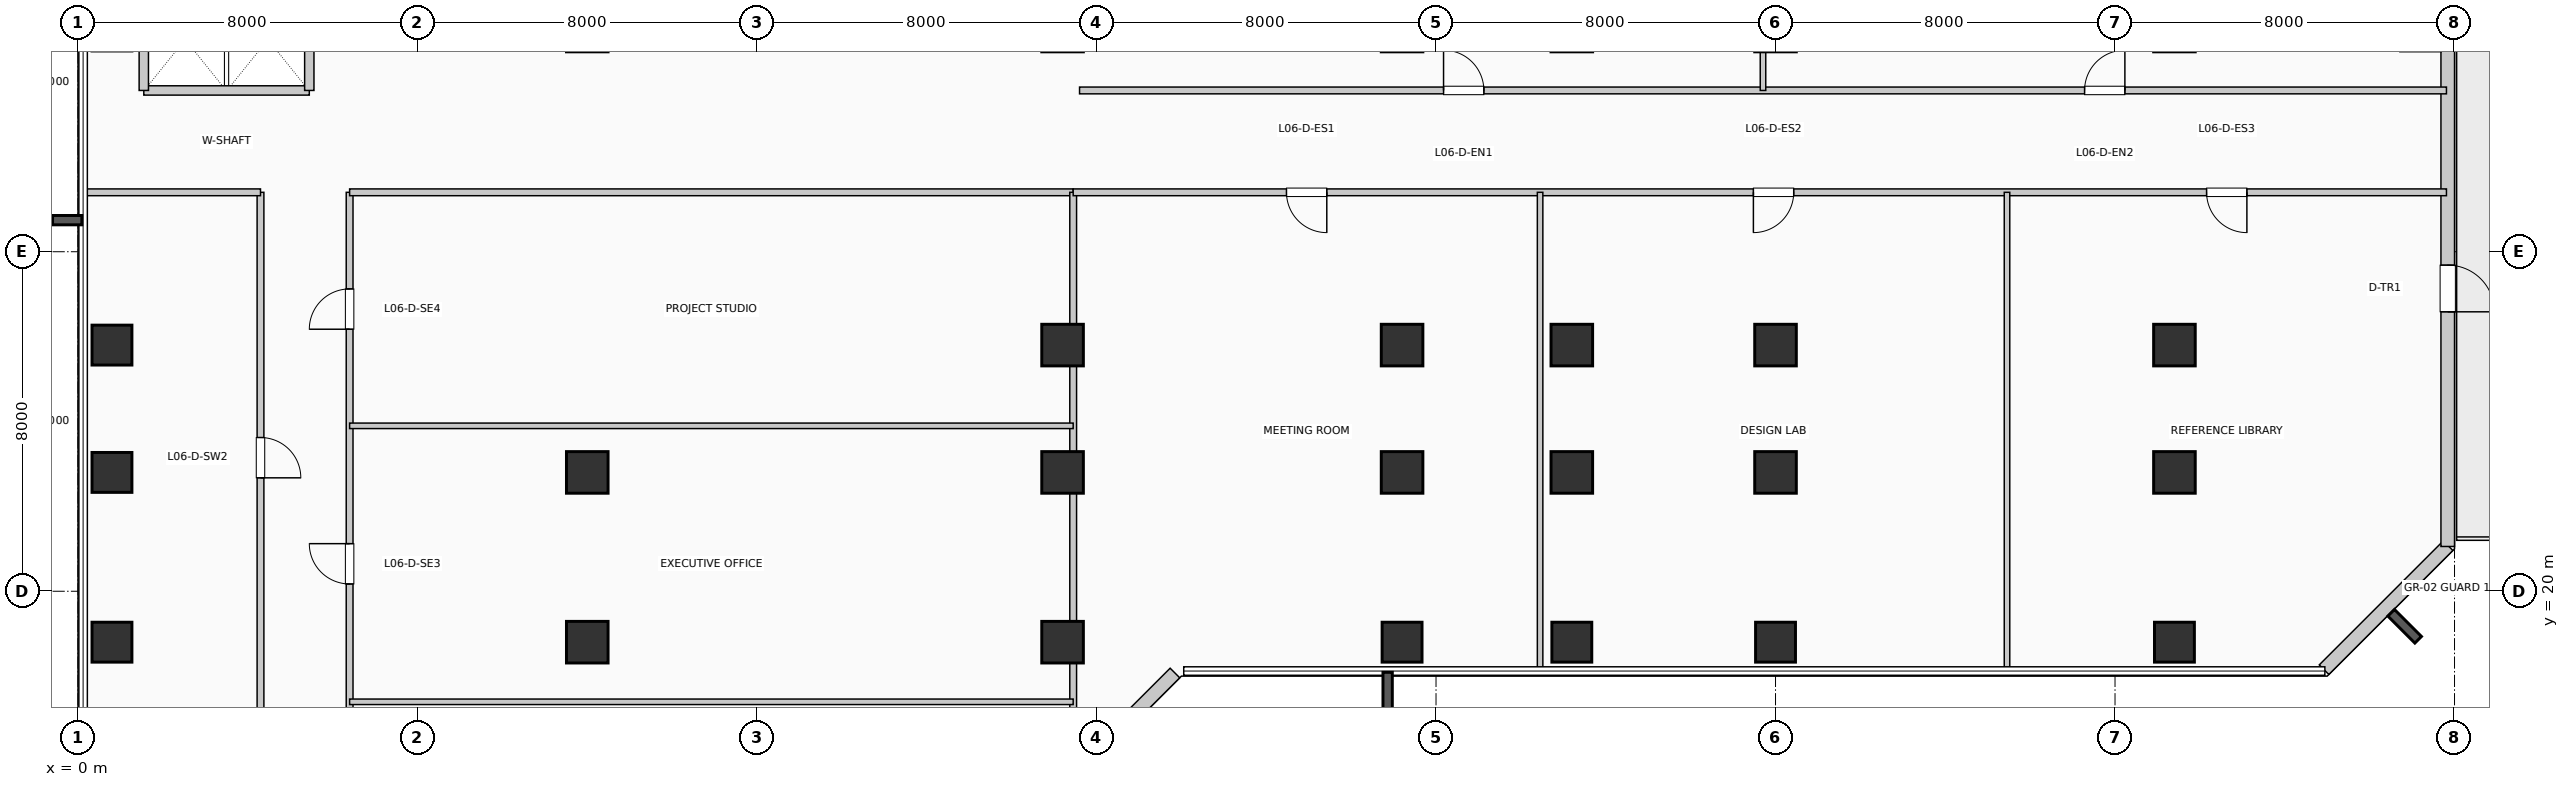
"""IFC4 building model, lengths in metres.
Left out: names, types, materials, properties, quantities, classifications, styles, units other than length and angle.
Written with IfcOpenShell. Run it as: python <this file> out.ifc"""

import sys

from ifc_helpers import new_model, si_unit, direction, frame, frame_2d, origin, origin_2d, place, context, subcontext, project, spatial, rectangle, extrude, element, fill, save


model = new_model("IFC4")
c1 = context("Model", 3, precision=1e-05, world=origin(), true_north=direction((0.0, 1.0)))
c2 = subcontext(c1, "Body", "Model", "MODEL_VIEW")
j1 = project(units=[si_unit("LENGTHUNIT", "METRE"), si_unit("PLANEANGLEUNIT", "RADIAN")], contexts=[c1])
p1 = place(None, origin())
s1 = spatial("IfcSite", under=j1, at=p1, CompositionType="ELEMENT")
p2 = place(p1, origin())
s2 = spatial("IfcBuilding", under=s1, at=p2, CompositionType="ELEMENT")
p3 = place(p2, frame((0.0, 0.0, 30.36)))
s3 = spatial("IfcBuildingStorey", under=s2, at=p3, CompositionType="ELEMENT", Elevation=30.36)
for number, where, z_axis, x_axis in (
    (1, (0.8, 18.8, 0.0), (0.0, 0.0, 1.0), (1.0, 0.0, 0.0)),
    (2, (0.8, 22.8, 0.0), (0.0, 0.0, 1.0), (1.0, 0.0, 0.0)),
    (3, (0.8, 25.8, 0.0), (0.0, 0.0, 1.0), (1.0, 0.0, 0.0)),
):
    element("IfcColumn", number, at=place(p3, frame(where, z_axis=z_axis, x_axis=x_axis)), inside=s3, PredefinedType="COLUMN", context=c2, shape_type="SweptSolid", body=[
        extrude(rectangle(XDim=0.94, YDim=0.94, at=origin_2d()), origin(), (0.0, 0.0, 1.0), 3.96),
    ])
for number, where, z_axis, x_axis in (
    (4, (12.0, 18.8, 0.0), (0.0, 0.0, 1.0), (1.0, 0.0, 0.0)),
    (5, (12.0, 22.8, 0.0), (0.0, 0.0, 1.0), (1.0, 0.0, 0.0)),
    (6, (23.2, 18.8, 0.0), (0.0, 0.0, 1.0), (1.0, 0.0, 0.0)),
    (7, (23.2, 22.8, 0.0), (0.0, 0.0, 1.0), (1.0, 0.0, 0.0)),
    (8, (23.2, 25.8, 0.0), (0.0, 0.0, 1.0), (1.0, 0.0, 0.0)),
):
    element("IfcColumn", number, at=place(p3, frame(where, z_axis=z_axis, x_axis=x_axis)), inside=s3, PredefinedType="COLUMN", context=c2, shape_type="SweptSolid", body=[
        extrude(rectangle(XDim=0.98, YDim=0.98, at=origin_2d()), origin(), (0.0, 0.0, 1.0), 3.96),
    ])
p4 = place(p3, frame((31.2, 18.8, 0.0), z_axis=(0.0, 0.0, 1.0), x_axis=(1.0, 0.0, 0.0)))
e9 = element("IfcColumn", 9, at=p4, inside=s3, PredefinedType="COLUMN", context=c2, shape_type="SweptSolid", body=[
    extrude(rectangle(XDim=0.94, YDim=0.94, at=origin_2d()), origin(), (0.0, 0.0, 1.0), 3.96),
])
for number, where, z_axis, x_axis in (
    (10, (31.2, 22.8, 0.0), (0.0, 0.0, 1.0), (1.0, 0.0, 0.0)),
    (11, (31.2, 25.8, 0.0), (0.0, 0.0, 1.0), (1.0, 0.0, 0.0)),
):
    element("IfcColumn", number, at=place(p3, frame(where, z_axis=z_axis, x_axis=x_axis)), inside=s3, PredefinedType="COLUMN", context=c2, shape_type="SweptSolid", body=[
        extrude(rectangle(XDim=0.98, YDim=0.98, at=origin_2d()), origin(), (0.0, 0.0, 1.0), 3.96),
    ])
p5 = place(p3, frame((35.2, 18.8, 0.0), z_axis=(0.0, 0.0, 1.0), x_axis=(1.0, 0.0, 0.0)))
e12 = element("IfcColumn", 12, at=p5, inside=s3, PredefinedType="COLUMN", context=c2, shape_type="SweptSolid", body=[
    extrude(rectangle(XDim=0.94, YDim=0.94, at=origin_2d()), origin(), (0.0, 0.0, 1.0), 3.96),
])
for number, where, z_axis, x_axis in (
    (13, (35.2, 22.8, 0.0), (0.0, 0.0, 1.0), (1.0, 0.0, 0.0)),
    (14, (35.2, 25.8, 0.0), (0.0, 0.0, 1.0), (1.0, 0.0, 0.0)),
):
    element("IfcColumn", number, at=place(p3, frame(where, z_axis=z_axis, x_axis=x_axis)), inside=s3, PredefinedType="COLUMN", context=c2, shape_type="SweptSolid", body=[
        extrude(rectangle(XDim=0.98, YDim=0.98, at=origin_2d()), origin(), (0.0, 0.0, 1.0), 3.96),
    ])
p6 = place(p3, frame((40.0, 18.8, 0.0), z_axis=(0.0, 0.0, 1.0), x_axis=(1.0, 0.0, 0.0)))
e15 = element("IfcColumn", 15, at=p6, inside=s3, PredefinedType="COLUMN", context=c2, shape_type="SweptSolid", body=[
    extrude(rectangle(XDim=0.94, YDim=0.94, at=origin_2d()), origin(), (0.0, 0.0, 1.0), 3.96),
])
for number, where, z_axis, x_axis in (
    (16, (40.0, 22.8, 0.0), (0.0, 0.0, 1.0), (1.0, 0.0, 0.0)),
    (17, (40.0, 25.8, 0.0), (0.0, 0.0, 1.0), (1.0, 0.0, 0.0)),
):
    element("IfcColumn", number, at=place(p3, frame(where, z_axis=z_axis, x_axis=x_axis)), inside=s3, PredefinedType="COLUMN", context=c2, shape_type="SweptSolid", body=[
        extrude(rectangle(XDim=0.98, YDim=0.98, at=origin_2d()), origin(), (0.0, 0.0, 1.0), 3.96),
    ])
p7 = place(p3, frame((49.4, 18.8, 0.0), z_axis=(0.0, 0.0, 1.0), x_axis=(1.0, 0.0, 0.0)))
e18 = element("IfcColumn", 18, at=p7, inside=s3, PredefinedType="COLUMN", context=c2, shape_type="SweptSolid", body=[
    extrude(rectangle(XDim=0.94, YDim=0.94, at=origin_2d()), origin(), (0.0, 0.0, 1.0), 3.96),
])
for number, where, z_axis, x_axis in (
    (19, (49.4, 22.8, 0.0), (0.0, 0.0, 1.0), (1.0, 0.0, 0.0)),
    (20, (49.4, 25.8, 0.0), (0.0, 0.0, 1.0), (1.0, 0.0, 0.0)),
):
    element("IfcColumn", number, at=place(p3, frame(where, z_axis=z_axis, x_axis=x_axis)), inside=s3, PredefinedType="COLUMN", context=c2, shape_type="SweptSolid", body=[
        extrude(rectangle(XDim=0.98, YDim=0.98, at=origin_2d()), origin(), (0.0, 0.0, 1.0), 3.96),
    ])
p8 = place(p3, frame((23.926, 16.152, 0.0), z_axis=(0.0, 0.0, 1.0), x_axis=(0.707106781187, 0.707106781187, 0.0)))
e21 = element("IfcWall", 21, at=p8, inside=s3, PredefinedType="SOLIDWALL", context=c2, shape_type="SweptSolid", body=[
    extrude(rectangle(XDim=2.718, YDim=0.32, at=frame_2d((1.359, 0.0))), origin(), (0.0, 0.0, 1.0), 3.71),
])
p9 = place(p3, frame((52.926, 18.152, 0.0), z_axis=(0.0, 0.0, 1.0), x_axis=(0.707106781187, 0.707106781187, 0.0)))
e22 = element("IfcWall", 22, at=p9, inside=s3, PredefinedType="SOLIDWALL", context=c2, shape_type="SweptSolid", body=[
    extrude(rectangle(XDim=4.133, YDim=0.32, at=frame_2d((2.066, 0.0))), origin(), (0.0, 0.0, 1.0), 3.71),
])
p10 = place(p3, frame((55.84, 21.055, 0.0), z_axis=(0.0, 0.0, 1.0), x_axis=(0.0, 1.0, 0.0)))
e23 = element("IfcWall", 23, at=p10, inside=s3, PredefinedType="SOLIDWALL", context=c2, shape_type="SweptSolid", body=[
    extrude(rectangle(XDim=21.89, YDim=0.32, at=frame_2d((10.945, 0.0))), origin(), (0.0, 0.0, 1.0), 3.71),
])
p11 = place(p10, frame((6.629, 0.0, 0.0), z_axis=(0.0, 0.0, 1.0), x_axis=(-1.0, 0.0, 0.0)))
e24 = element("IfcOpeningElement", 24, at=p11, cuts=e23, PredefinedType="OPENING", context=c2, shape_type="SweptSolid", body=[
    extrude(rectangle(XDim=1.1, YDim=2.2, at=frame_2d((0.55, 1.1))), frame((0.0, 0.17, 0.0), z_axis=(0.0, -1.0, 0.0), x_axis=(1.0, 0.0, 0.0)), (0.0, 0.0, 1.0), 0.34),
])
p12 = place(p3, frame((1.55, 31.8, 0.0), z_axis=(0.0, 0.0, 1.0), x_axis=(1.0, 0.0, 0.0)))
e25 = element("IfcWall", 25, at=p12, inside=s3, PredefinedType="PARTITIONING", context=c2, shape_type="SweptSolid", body=[
    extrude(rectangle(XDim=3.9, YDim=0.22, at=frame_2d((1.95, 0.0))), origin(), (0.0, 0.0, 1.0), 3.71),
])
for number, where, z_axis, x_axis in (
    (26, (1.55, 31.8, 0.0), (0.0, 0.0, 1.0), (0.0, 1.0, 0.0)),
    (27, (5.45, 31.8, 0.0), (0.0, 0.0, 1.0), (0.0, 1.0, 0.0)),
):
    element("IfcWall", number, at=place(p3, frame(where, z_axis=z_axis, x_axis=x_axis)), inside=s3, PredefinedType="PARTITIONING", context=c2, shape_type="SweptSolid", body=[
        extrude(rectangle(XDim=2.38, YDim=0.22, at=frame_2d((1.19, 0.0))), origin(), (0.0, 0.0, 1.0), 3.71),
    ])
p13 = place(p3, frame((4.3, 4.39, 0.0), z_axis=(0.0, 0.0, 1.0), x_axis=(0.0, 1.0, 0.0)))
e28 = element("IfcWall", 28, at=p13, inside=s3, PredefinedType="PARTITIONING", context=c2, shape_type="SweptSolid", body=[
    extrude(rectangle(XDim=25.01, YDim=0.16, at=frame_2d((12.505, 0.0))), origin(), (0.0, 0.0, 1.0), 3.71),
])
p14 = place(p13, frame((6.728, 0.0, 0.0), z_axis=(0.0, 0.0, 1.0), x_axis=(-1.0, 0.0, 0.0)))
e29 = element("IfcOpeningElement", 29, at=p14, cuts=e28, PredefinedType="OPENING", context=c2, shape_type="SweptSolid", body=[
    extrude(rectangle(XDim=0.95, YDim=2.15, at=frame_2d((0.475, 1.075))), frame((0.0, 0.09, 0.0), z_axis=(0.0, -1.0, 0.0), x_axis=(1.0, 0.0, 0.0)), (0.0, 0.0, 1.0), 0.18),
])
p15 = place(p13, frame((19.232, 0.0, 0.0), z_axis=(0.0, 0.0, 1.0), x_axis=(-1.0, 0.0, 0.0)))
e30 = element("IfcOpeningElement", 30, at=p15, cuts=e28, PredefinedType="OPENING", context=c2, shape_type="SweptSolid", body=[
    extrude(rectangle(XDim=0.95, YDim=2.15, at=frame_2d((0.475, 1.075))), frame((0.0, 0.09, 0.0), z_axis=(0.0, -1.0, 0.0), x_axis=(1.0, 0.0, 0.0)), (0.0, 0.0, 1.0), 0.18),
])
p16 = place(p3, frame((6.4, 4.39, 0.0), z_axis=(0.0, 0.0, 1.0), x_axis=(0.0, 1.0, 0.0)))
e31 = element("IfcWall", 31, at=p16, inside=s3, PredefinedType="PARTITIONING", context=c2, shape_type="SweptSolid", body=[
    extrude(rectangle(XDim=25.01, YDim=0.16, at=frame_2d((12.505, 0.0))), origin(), (0.0, 0.0, 1.0), 3.71),
])
p17 = place(p16, frame((2.526, 0.0, 0.0)))
e32 = element("IfcOpeningElement", 32, at=p17, cuts=e31, PredefinedType="OPENING", context=c2, shape_type="SweptSolid", body=[
    extrude(rectangle(XDim=0.95, YDim=2.15, at=frame_2d((0.475, 1.075))), frame((0.0, 0.09, 0.0), z_axis=(0.0, -1.0, 0.0), x_axis=(1.0, 0.0, 0.0)), (0.0, 0.0, 1.0), 0.18),
])
p18 = place(p16, frame((9.029, 0.0, 0.0)))
e33 = element("IfcOpeningElement", 33, at=p18, cuts=e31, PredefinedType="OPENING", context=c2, shape_type="SweptSolid", body=[
    extrude(rectangle(XDim=0.95, YDim=2.15, at=frame_2d((0.475, 1.075))), frame((0.0, 0.09, 0.0), z_axis=(0.0, -1.0, 0.0), x_axis=(1.0, 0.0, 0.0)), (0.0, 0.0, 1.0), 0.18),
])
p19 = place(p16, frame((15.781, 0.0, 0.0)))
e34 = element("IfcOpeningElement", 34, at=p19, cuts=e31, PredefinedType="OPENING", context=c2, shape_type="SweptSolid", body=[
    extrude(rectangle(XDim=0.95, YDim=2.15, at=frame_2d((0.475, 1.075))), frame((0.0, 0.09, 0.0), z_axis=(0.0, -1.0, 0.0), x_axis=(1.0, 0.0, 0.0)), (0.0, 0.0, 1.0), 0.18),
])
p20 = place(p16, frame((21.784, 0.0, 0.0)))
e35 = element("IfcOpeningElement", 35, at=p20, cuts=e31, PredefinedType="OPENING", context=c2, shape_type="SweptSolid", body=[
    extrude(rectangle(XDim=0.95, YDim=2.15, at=frame_2d((0.475, 1.075))), frame((0.0, 0.09, 0.0), z_axis=(0.0, -1.0, 0.0), x_axis=(1.0, 0.0, 0.0)), (0.0, 0.0, 1.0), 0.18),
])
p21 = place(p3, frame((0.19, 29.4, 0.0), z_axis=(0.0, 0.0, 1.0), x_axis=(1.0, 0.0, 0.0)))
e36 = element("IfcWall", 36, at=p21, inside=s3, PredefinedType="PARTITIONING", context=c2, shape_type="SweptSolid", body=[
    extrude(rectangle(XDim=4.11, YDim=0.16, at=frame_2d((2.055, 0.0))), origin(), (0.0, 0.0, 1.0), 3.365),
])
p22 = place(p3, frame((6.4, 29.4, 0.0), z_axis=(0.0, 0.0, 1.0), x_axis=(1.0, 0.0, 0.0)))
e37 = element("IfcWall", 37, at=p22, inside=s3, PredefinedType="PARTITIONING", context=c2, shape_type="SweptSolid", body=[
    extrude(rectangle(XDim=17.05, YDim=0.16, at=frame_2d((8.525, 0.0))), origin(), (0.0, 0.0, 1.0), 3.365),
])
p23 = place(p3, frame((23.45, 0.19, 0.0), z_axis=(0.0, 0.0, 1.0), x_axis=(0.0, 1.0, 0.0)))
e38 = element("IfcWall", 38, at=p23, inside=s3, PredefinedType="PARTITIONING", context=c2, shape_type="SweptSolid", body=[
    extrude(rectangle(XDim=29.21, YDim=0.16, at=frame_2d((14.605, 0.0))), origin(), (0.0, 0.0, 1.0), 2.995),
])
for number, where, z_axis, x_axis in (
    (39, (6.4, 17.395, 0.0), (0.0, 0.0, 1.0), (1.0, 0.0, 0.0)),
    (40, (6.4, 23.898, 0.0), (0.0, 0.0, 1.0), (1.0, 0.0, 0.0)),
):
    element("IfcWall", number, at=place(p3, frame(where, z_axis=z_axis, x_axis=x_axis)), inside=s3, PredefinedType="PARTITIONING", context=c2, shape_type="SweptSolid", body=[
        extrude(rectangle(XDim=17.05, YDim=0.13, at=frame_2d((8.525, 0.0))), origin(), (0.0, 0.0, 1.0), 3.71),
    ])
p24 = place(p3, frame((23.45, 29.4, 0.0), z_axis=(0.0, 0.0, 1.0), x_axis=(1.0, 0.0, 0.0)))
e41 = element("IfcWall", 41, at=p24, inside=s3, PredefinedType="PARTITIONING", context=c2, shape_type="SweptSolid", body=[
    extrude(rectangle(XDim=32.36, YDim=0.16, at=frame_2d((16.18, 0.0))), origin(), (0.0, 0.0, 1.0), 3.365),
])
p25 = place(p24, frame((5.976, 0.0, 0.0), z_axis=(0.0, 0.0, 1.0), x_axis=(-1.0, 0.0, 0.0)))
e42 = element("IfcOpeningElement", 42, at=p25, cuts=e41, PredefinedType="OPENING", context=c2, shape_type="SweptSolid", body=[
    extrude(rectangle(XDim=0.95, YDim=2.15, at=frame_2d((0.475, 1.075))), frame((0.0, 0.09, 0.0), z_axis=(0.0, -1.0, 0.0), x_axis=(1.0, 0.0, 0.0)), (0.0, 0.0, 1.0), 0.18),
])
p26 = place(p24, frame((16.979, 0.0, 0.0), z_axis=(0.0, 0.0, 1.0), x_axis=(-1.0, 0.0, 0.0)))
e43 = element("IfcOpeningElement", 43, at=p26, cuts=e41, PredefinedType="OPENING", context=c2, shape_type="SweptSolid", body=[
    extrude(rectangle(XDim=0.95, YDim=2.15, at=frame_2d((0.475, 1.075))), frame((0.0, 0.09, 0.0), z_axis=(0.0, -1.0, 0.0), x_axis=(1.0, 0.0, 0.0)), (0.0, 0.0, 1.0), 0.18),
])
p27 = place(p24, frame((27.657, 0.0, 0.0), z_axis=(0.0, 0.0, 1.0), x_axis=(-1.0, 0.0, 0.0)))
e44 = element("IfcOpeningElement", 44, at=p27, cuts=e41, PredefinedType="OPENING", context=c2, shape_type="SweptSolid", body=[
    extrude(rectangle(XDim=0.95, YDim=2.15, at=frame_2d((0.475, 1.075))), frame((0.0, 0.09, 0.0), z_axis=(0.0, -1.0, 0.0), x_axis=(1.0, 0.0, 0.0)), (0.0, 0.0, 1.0), 0.18),
])
p28 = place(p3, frame((23.6, 31.8, 0.0), z_axis=(0.0, 0.0, 1.0), x_axis=(1.0, 0.0, 0.0)))
e45 = element("IfcWall", 45, at=p28, inside=s3, PredefinedType="PARTITIONING", context=c2, shape_type="SweptSolid", body=[
    extrude(rectangle(XDim=32.21, YDim=0.16, at=frame_2d((16.105, 0.0))), origin(), (0.0, 0.0, 1.0), 3.71),
])
p29 = place(p28, frame((8.577, 0.0, 0.0)))
e46 = element("IfcOpeningElement", 46, at=p29, cuts=e45, PredefinedType="OPENING", context=c2, shape_type="SweptSolid", body=[
    extrude(rectangle(XDim=0.95, YDim=2.15, at=frame_2d((0.475, 1.075))), frame((0.0, 0.09, 0.0), z_axis=(0.0, -1.0, 0.0), x_axis=(1.0, 0.0, 0.0)), (0.0, 0.0, 1.0), 0.18),
])
p30 = place(p28, frame((23.683, 0.0, 0.0)))
e47 = element("IfcOpeningElement", 47, at=p30, cuts=e45, PredefinedType="OPENING", context=c2, shape_type="SweptSolid", body=[
    extrude(rectangle(XDim=0.95, YDim=2.15, at=frame_2d((0.475, 1.075))), frame((0.0, 0.09, 0.0), z_axis=(0.0, -1.0, 0.0), x_axis=(1.0, 0.0, 0.0)), (0.0, 0.0, 1.0), 0.18),
])
for number, where, z_axis, x_axis in (
    (48, (34.452, 18.19, 0.0), (0.0, 0.0, 1.0), (0.0, 1.0, 0.0)),
    (49, (45.455, 18.19, 0.0), (0.0, 0.0, 1.0), (0.0, 1.0, 0.0)),
):
    element("IfcWall", number, at=place(p3, frame(where, z_axis=z_axis, x_axis=x_axis)), inside=s3, PredefinedType="PARTITIONING", context=c2, shape_type="SweptSolid", body=[
        extrude(rectangle(XDim=11.21, YDim=0.13, at=frame_2d((5.605, 0.0))), origin(), (0.0, 0.0, 1.0), 3.71),
    ])
p31 = place(p3, frame((39.705, 31.8, 0.0), z_axis=(0.0, 0.0, 1.0), x_axis=(0.0, 1.0, 0.0)))
e50 = element("IfcWall", 50, at=p31, inside=s3, PredefinedType="PARTITIONING", context=c2, shape_type="SweptSolid", body=[
    extrude(rectangle(XDim=14.01, YDim=0.13, at=frame_2d((7.005, 0.0))), origin(), (0.0, 0.0, 1.0), 2.995),
])
p32 = place(p11, origin())
e51 = element("IfcDoor", 51, at=p32, inside=s3, OperationType="SINGLE_SWING_LEFT", PredefinedType="DOOR", context=c2, shape_type="SweptSolid", body=[
    extrude(rectangle(XDim=1.1, YDim=2.2, at=frame_2d((0.55, 1.1))), frame((0.0, 0.025, 0.0), z_axis=(0.0, -1.0, 0.0), x_axis=(1.0, 0.0, 0.0)), (0.0, 0.0, 1.0), 0.05),
])
fill(e24, e51)
p33 = place(p15, origin())
e52 = element("IfcDoor", 52, at=p33, inside=s3, OperationType="SINGLE_SWING_LEFT", PredefinedType="DOOR", context=c2, shape_type="SweptSolid", body=[
    extrude(rectangle(XDim=0.95, YDim=2.15, at=frame_2d((0.475, 1.075))), frame((0.0, 0.025, 0.0), z_axis=(0.0, -1.0, 0.0), x_axis=(1.0, 0.0, 0.0)), (0.0, 0.0, 1.0), 0.05),
])
fill(e30, e52)
p34 = place(p19, origin())
e53 = element("IfcDoor", 53, at=p34, inside=s3, OperationType="SINGLE_SWING_RIGHT", PredefinedType="DOOR", context=c2, shape_type="SweptSolid", body=[
    extrude(rectangle(XDim=0.95, YDim=2.15, at=frame_2d((0.475, 1.075))), frame((0.0, 0.025, 0.0), z_axis=(0.0, -1.0, 0.0), x_axis=(1.0, 0.0, 0.0)), (0.0, 0.0, 1.0), 0.05),
])
fill(e34, e53)
p35 = place(p20, origin())
e54 = element("IfcDoor", 54, at=p35, inside=s3, OperationType="SINGLE_SWING_LEFT", PredefinedType="DOOR", context=c2, shape_type="SweptSolid", body=[
    extrude(rectangle(XDim=0.95, YDim=2.15, at=frame_2d((0.475, 1.075))), frame((0.0, 0.025, 0.0), z_axis=(0.0, -1.0, 0.0), x_axis=(1.0, 0.0, 0.0)), (0.0, 0.0, 1.0), 0.05),
])
fill(e35, e54)
p36 = place(p25, origin())
e55 = element("IfcDoor", 55, at=p36, inside=s3, OperationType="SINGLE_SWING_RIGHT", PredefinedType="DOOR", context=c2, shape_type="SweptSolid", body=[
    extrude(rectangle(XDim=0.95, YDim=2.15, at=frame_2d((0.475, 1.075))), frame((0.0, 0.025, 0.0), z_axis=(0.0, -1.0, 0.0), x_axis=(1.0, 0.0, 0.0)), (0.0, 0.0, 1.0), 0.05),
])
fill(e42, e55)
p37 = place(p26, origin())
e56 = element("IfcDoor", 56, at=p37, inside=s3, OperationType="SINGLE_SWING_LEFT", PredefinedType="DOOR", context=c2, shape_type="SweptSolid", body=[
    extrude(rectangle(XDim=0.95, YDim=2.15, at=frame_2d((0.475, 1.075))), frame((0.0, 0.025, 0.0), z_axis=(0.0, -1.0, 0.0), x_axis=(1.0, 0.0, 0.0)), (0.0, 0.0, 1.0), 0.05),
])
fill(e43, e56)
p38 = place(p27, origin())
e57 = element("IfcDoor", 57, at=p38, inside=s3, OperationType="SINGLE_SWING_RIGHT", PredefinedType="DOOR", context=c2, shape_type="SweptSolid", body=[
    extrude(rectangle(XDim=0.95, YDim=2.15, at=frame_2d((0.475, 1.075))), frame((0.0, 0.025, 0.0), z_axis=(0.0, -1.0, 0.0), x_axis=(1.0, 0.0, 0.0)), (0.0, 0.0, 1.0), 0.05),
])
fill(e44, e57)
p39 = place(p29, origin())
e58 = element("IfcDoor", 58, at=p39, inside=s3, OperationType="SINGLE_SWING_LEFT", PredefinedType="DOOR", context=c2, shape_type="SweptSolid", body=[
    extrude(rectangle(XDim=0.95, YDim=2.15, at=frame_2d((0.475, 1.075))), frame((0.0, 0.025, 0.0), z_axis=(0.0, -1.0, 0.0), x_axis=(1.0, 0.0, 0.0)), (0.0, 0.0, 1.0), 0.05),
])
fill(e46, e58)
p40 = place(p30, origin())
e59 = element("IfcDoor", 59, at=p40, inside=s3, OperationType="SINGLE_SWING_RIGHT", PredefinedType="DOOR", context=c2, shape_type="SweptSolid", body=[
    extrude(rectangle(XDim=0.95, YDim=2.15, at=frame_2d((0.475, 1.075))), frame((0.0, 0.025, 0.0), z_axis=(0.0, -1.0, 0.0), x_axis=(1.0, 0.0, 0.0)), (0.0, 0.0, 1.0), 0.05),
])
fill(e47, e59)
save(model, sys.argv[1])
